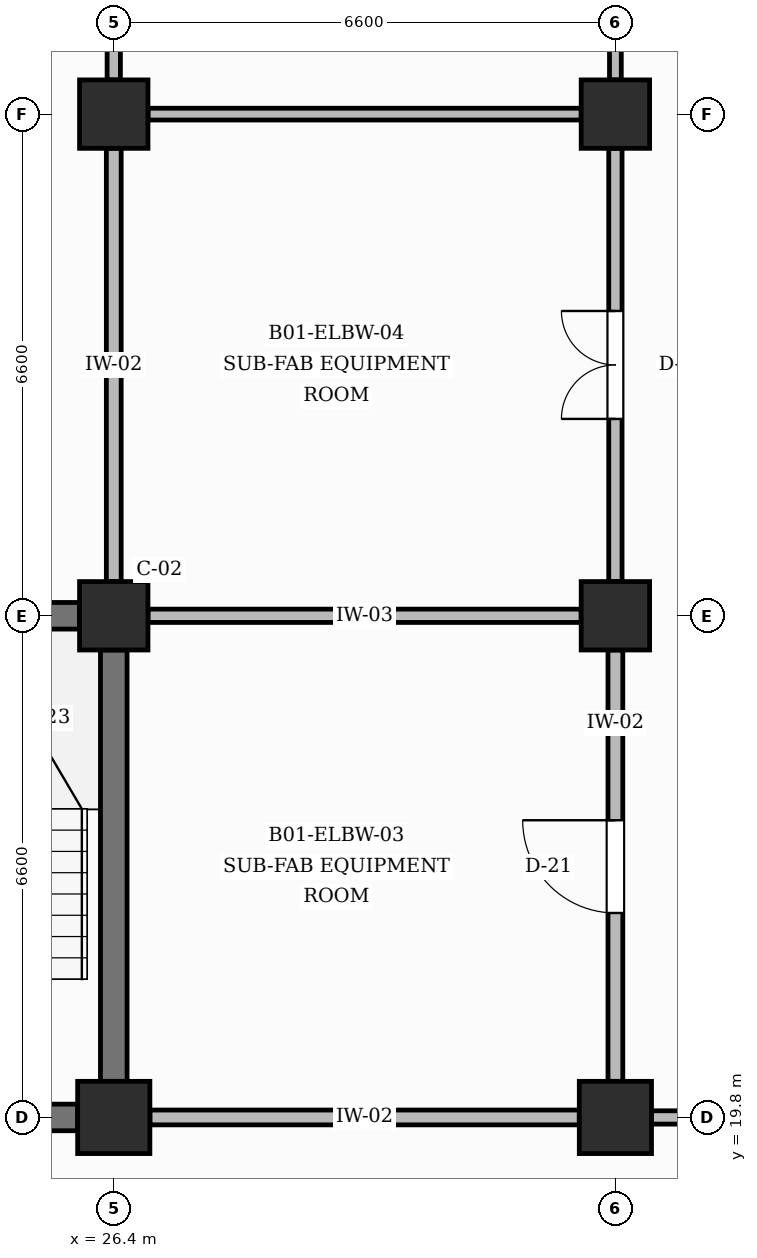
"""IFC4 building model, lengths in metres.
Left out: names, types, materials, properties, quantities, classifications, styles, units other than length and angle.
Written with IfcOpenShell. Run it as: python <this file> out.ifc"""

import sys

from ifc_helpers import new_model, si_unit, direction, frame, frame_2d, origin, origin_2d, place, context, subcontext, project, spatial, rectangle, extrude, element, fill, save


model = new_model("IFC4")
c1 = context("Model", 3, precision=1e-05, world=origin(), true_north=direction((0.0, 1.0)))
c2 = subcontext(c1, "Body", "Model", "MODEL_VIEW")
j1 = project(units=[si_unit("LENGTHUNIT", "METRE"), si_unit("PLANEANGLEUNIT", "RADIAN")], contexts=[c1])
p1 = place(None, origin())
s1 = spatial("IfcSite", under=j1, at=p1, CompositionType="ELEMENT")
p2 = place(p1, origin())
s2 = spatial("IfcBuilding", under=s1, at=p2, CompositionType="ELEMENT")
p3 = place(p2, frame((0.0, 0.0, -4.5)))
s3 = spatial("IfcBuildingStorey", under=s2, at=p3, CompositionType="ELEMENT", Elevation=-4.5)
p4 = place(p3, frame((26.4, 19.8, 0.0), z_axis=(0.0, 0.0, 1.0), x_axis=(1.0, 0.0, 0.0)))
e1 = element("IfcColumn", 1, at=p4, inside=s3, PredefinedType="COLUMN", context=c2, shape_type="SweptSolid", body=[
    extrude(rectangle(XDim=0.95, YDim=0.95, at=origin_2d()), origin(), (0.0, 0.0, 1.0), 4.5),
])
for number, where, z_axis, x_axis in (
    (2, (26.4, 26.4, 0.0), (0.0, 0.0, 1.0), (1.0, 0.0, 0.0)),
    (3, (26.4, 33.0, 0.0), (0.0, 0.0, 1.0), (1.0, 0.0, 0.0)),
):
    element("IfcColumn", number, at=place(p3, frame(where, z_axis=z_axis, x_axis=x_axis)), inside=s3, PredefinedType="COLUMN", context=c2, shape_type="SweptSolid", body=[
        extrude(rectangle(XDim=0.9, YDim=0.9, at=origin_2d()), origin(), (0.0, 0.0, 1.0), 4.5),
    ])
p5 = place(p3, frame((33.0, 19.8, 0.0), z_axis=(0.0, 0.0, 1.0), x_axis=(1.0, 0.0, 0.0)))
e4 = element("IfcColumn", 4, at=p5, inside=s3, PredefinedType="COLUMN", context=c2, shape_type="SweptSolid", body=[
    extrude(rectangle(XDim=0.95, YDim=0.95, at=origin_2d()), origin(), (0.0, 0.0, 1.0), 4.5),
])
for number, where, z_axis, x_axis in (
    (5, (33.0, 26.4, 0.0), (0.0, 0.0, 1.0), (1.0, 0.0, 0.0)),
    (6, (33.0, 33.0, 0.0), (0.0, 0.0, 1.0), (1.0, 0.0, 0.0)),
):
    element("IfcColumn", number, at=place(p3, frame(where, z_axis=z_axis, x_axis=x_axis)), inside=s3, PredefinedType="COLUMN", context=c2, shape_type="SweptSolid", body=[
        extrude(rectangle(XDim=0.9, YDim=0.9, at=origin_2d()), origin(), (0.0, 0.0, 1.0), 4.5),
    ])
p6 = place(p3, frame((20.275, 19.8, 0.0), z_axis=(0.0, 0.0, 1.0), x_axis=(1.0, 0.0, 0.0)))
e7 = element("IfcWall", 7, at=p6, inside=s3, PredefinedType="SHEAR", context=c2, shape_type="SweptSolid", body=[
    extrude(rectangle(XDim=5.65, YDim=0.35, at=frame_2d((2.825, 0.0))), origin(), (0.0, 0.0, 1.0), 3.24),
])
p7 = place(p6, frame((2.275, 0.0, 0.0)))
e8 = element("IfcOpeningElement", 8, at=p7, cuts=e7, PredefinedType="OPENING", context=c2, shape_type="SweptSolid", body=[
    extrude(rectangle(XDim=1.1, YDim=2.15, at=frame_2d((0.55, 1.075))), frame((0.0, 0.185, 0.0), z_axis=(0.0, -1.0, 0.0), x_axis=(1.0, 0.0, 0.0)), (0.0, 0.0, 1.0), 0.37),
])
for number, where, z_axis, x_axis in (
    (9, (20.275, 26.4, 0.0), (0.0, 0.0, 1.0), (1.0, 0.0, 0.0)),
    (10, (26.4, 20.275, 0.0), (0.0, 0.0, 1.0), (0.0, 1.0, 0.0)),
):
    element("IfcWall", number, at=place(p3, frame(where, z_axis=z_axis, x_axis=x_axis)), inside=s3, PredefinedType="SHEAR", context=c2, shape_type="SweptSolid", body=[
        extrude(rectangle(XDim=5.675, YDim=0.35, at=frame_2d((2.837, 0.0))), origin(), (0.0, 0.0, 1.0), 3.34),
    ])
p8 = place(p3, frame((26.4, 26.85, 0.0), z_axis=(0.0, 0.0, 1.0), x_axis=(0.0, 1.0, 0.0)))
e11 = element("IfcWall", 11, at=p8, inside=s3, PredefinedType="PARTITIONING", context=c2, shape_type="SweptSolid", body=[
    extrude(rectangle(XDim=5.7, YDim=0.195, at=frame_2d((2.85, 0.0))), origin(), (0.0, 0.0, 1.0), 3.34),
])
p9 = place(p3, frame((26.4, 33.45, 0.0), z_axis=(0.0, 0.0, 1.0), x_axis=(0.0, 1.0, 0.0)))
e12 = element("IfcWall", 12, at=p9, inside=s3, PredefinedType="PARTITIONING", context=c2, shape_type="SweptSolid", body=[
    extrude(rectangle(XDim=5.7, YDim=0.175, at=frame_2d((2.85, 0.0))), origin(), (0.0, 0.0, 1.0), 3.34),
])
p10 = place(p3, frame((26.875, 19.8, 0.0), z_axis=(0.0, 0.0, 1.0), x_axis=(1.0, 0.0, 0.0)))
e13 = element("IfcWall", 13, at=p10, inside=s3, PredefinedType="PARTITIONING", context=c2, shape_type="SweptSolid", body=[
    extrude(rectangle(XDim=5.65, YDim=0.195, at=frame_2d((2.825, 0.0))), origin(), (0.0, 0.0, 1.0), 3.34),
])
p11 = place(p3, frame((33.0, 20.275, 0.0), z_axis=(0.0, 0.0, 1.0), x_axis=(0.0, 1.0, 0.0)))
e14 = element("IfcWall", 14, at=p11, inside=s3, PredefinedType="PARTITIONING", context=c2, shape_type="SweptSolid", body=[
    extrude(rectangle(XDim=5.675, YDim=0.195, at=frame_2d((2.837, 0.0))), origin(), (0.0, 0.0, 1.0), 3.34),
])
p12 = place(p11, frame((2.215, 0.0, 0.0)))
e15 = element("IfcOpeningElement", 15, at=p12, cuts=e14, PredefinedType="OPENING", context=c2, shape_type="SweptSolid", body=[
    extrude(rectangle(XDim=1.22, YDim=2.15, at=frame_2d((0.61, 1.075))), frame((0.0, 0.107, 0.0), z_axis=(0.0, -1.0, 0.0), x_axis=(1.0, 0.0, 0.0)), (0.0, 0.0, 1.0), 0.215),
])
p13 = place(p3, frame((26.85, 26.4, 0.0), z_axis=(0.0, 0.0, 1.0), x_axis=(1.0, 0.0, 0.0)))
e16 = element("IfcWall", 16, at=p13, inside=s3, PredefinedType="PARTITIONING", context=c2, shape_type="SweptSolid", body=[
    extrude(rectangle(XDim=5.7, YDim=0.175, at=frame_2d((2.85, 0.0))), origin(), (0.0, 0.0, 1.0), 3.24),
])
p14 = place(p3, frame((33.0, 26.85, 0.0), z_axis=(0.0, 0.0, 1.0), x_axis=(0.0, 1.0, 0.0)))
e17 = element("IfcWall", 17, at=p14, inside=s3, PredefinedType="PARTITIONING", context=c2, shape_type="SweptSolid", body=[
    extrude(rectangle(XDim=5.7, YDim=0.175, at=frame_2d((2.85, 0.0))), origin(), (0.0, 0.0, 1.0), 3.34),
])
p15 = place(p14, frame((2.14, 0.0, 0.0)))
e18 = element("IfcOpeningElement", 18, at=p15, cuts=e17, PredefinedType="OPENING", context=c2, shape_type="SweptSolid", body=[
    extrude(rectangle(XDim=1.42, YDim=2.2, at=frame_2d((0.71, 1.1))), frame((0.0, 0.097, 0.0), z_axis=(0.0, -1.0, 0.0), x_axis=(1.0, 0.0, 0.0)), (0.0, 0.0, 1.0), 0.195),
])
p16 = place(p3, frame((26.85, 33.0, 0.0), z_axis=(0.0, 0.0, 1.0), x_axis=(1.0, 0.0, 0.0)))
e19 = element("IfcWall", 19, at=p16, inside=s3, PredefinedType="PARTITIONING", context=c2, shape_type="SweptSolid", body=[
    extrude(rectangle(XDim=5.7, YDim=0.155, at=frame_2d((2.85, 0.0))), origin(), (0.0, 0.0, 1.0), 3.34),
])
p17 = place(p3, frame((33.0, 33.45, 0.0), z_axis=(0.0, 0.0, 1.0), x_axis=(0.0, 1.0, 0.0)))
e20 = element("IfcWall", 20, at=p17, inside=s3, PredefinedType="PARTITIONING", context=c2, shape_type="SweptSolid", body=[
    extrude(rectangle(XDim=5.7, YDim=0.155, at=frame_2d((2.85, 0.0))), origin(), (0.0, 0.0, 1.0), 3.34),
])
p18 = place(p17, frame((2.24, 0.0, 0.0)))
e21 = element("IfcOpeningElement", 21, at=p18, cuts=e20, PredefinedType="OPENING", context=c2, shape_type="SweptSolid", body=[
    extrude(rectangle(XDim=1.22, YDim=2.15, at=frame_2d((0.61, 1.075))), frame((0.0, 0.087, 0.0), z_axis=(0.0, -1.0, 0.0), x_axis=(1.0, 0.0, 0.0)), (0.0, 0.0, 1.0), 0.175),
])
p19 = place(p3, frame((33.475, 19.8, 0.0), z_axis=(0.0, 0.0, 1.0), x_axis=(1.0, 0.0, 0.0)))
e22 = element("IfcWall", 22, at=p19, inside=s3, PredefinedType="PARTITIONING", context=c2, shape_type="SweptSolid", body=[
    extrude(rectangle(XDim=5.675, YDim=0.175, at=frame_2d((2.837, 0.0))), origin(), (0.0, 0.0, 1.0), 3.24),
])
p20 = place(p19, frame((1.925, 0.0, 0.0)))
e23 = element("IfcOpeningElement", 23, at=p20, cuts=e22, PredefinedType="OPENING", context=c2, shape_type="SweptSolid", body=[
    extrude(rectangle(XDim=1.8, YDim=2.3, at=frame_2d((0.9, 1.15))), frame((0.0, 0.097, 0.0), z_axis=(0.0, -1.0, 0.0), x_axis=(1.0, 0.0, 0.0)), (0.0, 0.0, 1.0), 0.195),
])
p21 = place(p12, origin())
e24 = element("IfcDoor", 24, at=p21, inside=s3, OperationType="SINGLE_SWING_RIGHT", PredefinedType="DOOR", context=c2, shape_type="SweptSolid", body=[
    extrude(rectangle(XDim=1.22, YDim=2.15, at=frame_2d((0.61, 1.075))), frame((0.0, 0.025, 0.0), z_axis=(0.0, -1.0, 0.0), x_axis=(1.0, 0.0, 0.0)), (0.0, 0.0, 1.0), 0.05),
])
fill(e15, e24)
p22 = place(p15, origin())
e25 = element("IfcDoor", 25, at=p22, inside=s3, OperationType="DOUBLE_DOOR_SINGLE_SWING", PredefinedType="DOOR", context=c2, shape_type="SweptSolid", body=[
    extrude(rectangle(XDim=1.42, YDim=2.2, at=frame_2d((0.71, 1.1))), frame((0.0, 0.025, 0.0), z_axis=(0.0, -1.0, 0.0), x_axis=(1.0, 0.0, 0.0)), (0.0, 0.0, 1.0), 0.05),
])
fill(e18, e25)
save(model, sys.argv[1])
